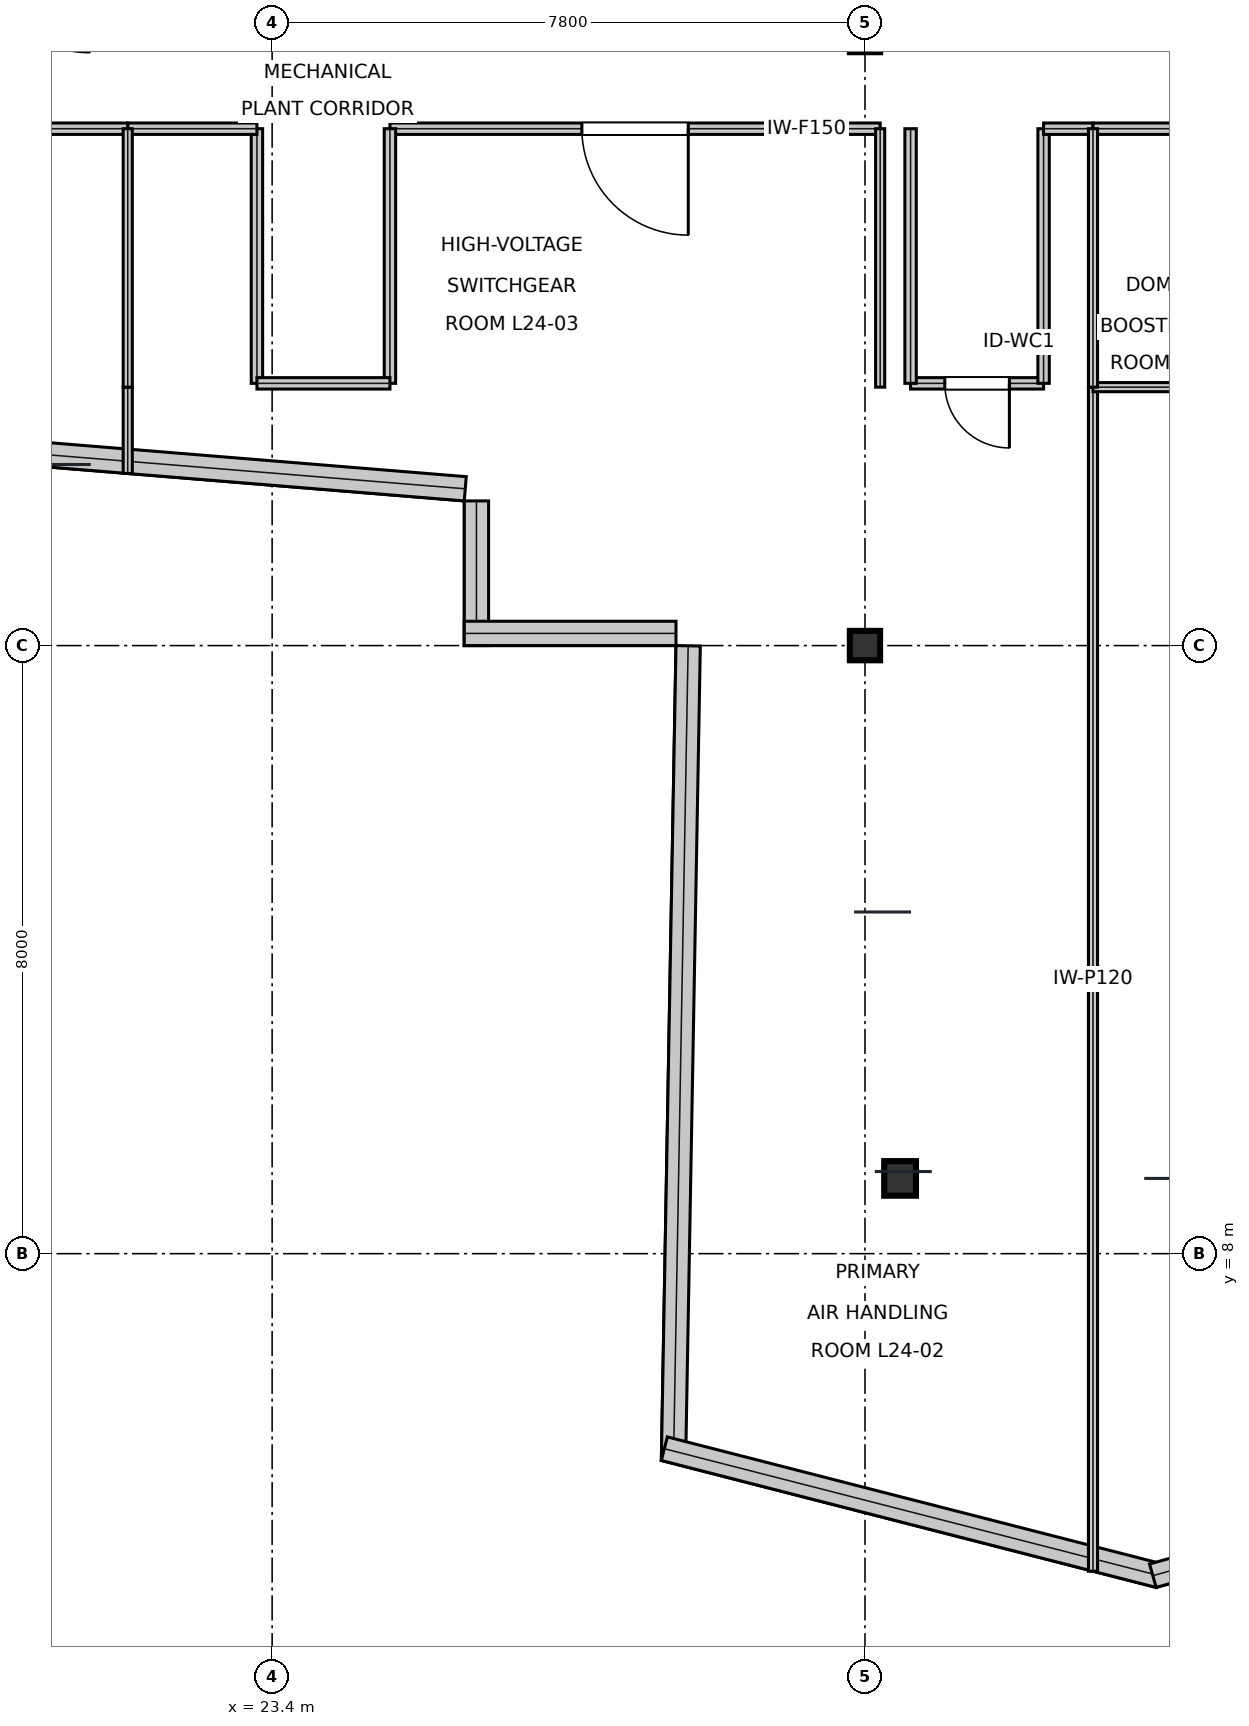
"""IFC4 building model, lengths in metres.
Left out: names, types, materials, properties, quantities, classifications, styles, units other than length and angle.
Written with IfcOpenShell. Run it as: python <this file> out.ifc"""

import sys

from ifc_helpers import new_model, si_unit, direction, frame, frame_2d, origin, origin_2d, place, context, subcontext, project, spatial, rectangle, i_section, extrude, element, fill, save


model = new_model("IFC4")
c1 = context("Model", 3, precision=1e-05, world=origin(), true_north=direction((0.0, 1.0)))
c2 = subcontext(c1, "Body", "Model", "MODEL_VIEW")
j1 = project(units=[si_unit("LENGTHUNIT", "METRE"), si_unit("PLANEANGLEUNIT", "RADIAN")], contexts=[c1])
p1 = place(None, origin())
s1 = spatial("IfcSite", under=j1, at=p1, CompositionType="ELEMENT")
p2 = place(p1, origin())
s2 = spatial("IfcBuilding", under=s1, at=p2, CompositionType="ELEMENT")
p3 = place(p2, frame((0.0, 0.0, 106.65)))
s3 = spatial("IfcBuildingStorey", under=s2, at=p3, CompositionType="ELEMENT", Elevation=106.65)
p4 = place(p3, frame((31.2, 16.0, 0.0), z_axis=(0.0, 0.0, 1.0), x_axis=(1.0, 0.0, 0.0)))
e1 = element("IfcColumn", 1, at=p4, inside=s3, PredefinedType="COLUMN", context=c2, shape_type="SweptSolid", body=[
    extrude(i_section(OverallWidth=0.398, OverallDepth=0.387, WebThickness=0.021, FlangeThickness=0.033, at=origin_2d()), origin(), (0.0, 0.0, 1.0), 5.394),
])
p5 = place(p3, frame((31.662, 8.99, 0.016), z_axis=(0.007821463692, 0.016779768036, 0.999828617359), x_axis=(-0.906371306068, 0.422482018004, 0.0)))
e2 = element("IfcColumn", 2, at=p5, inside=s3, PredefinedType="COLUMN", context=c2, shape_type="SweptSolid", body=[
    extrude(i_section(OverallWidth=0.418, OverallDepth=0.455, WebThickness=0.042, FlangeThickness=0.068, at=origin_2d()), origin(), (0.0, 0.0, 1.0), 5.369),
])
p6 = place(p3, frame((9.513, 19.402, 0.0), z_axis=(0.0, 0.0, 1.0), x_axis=(0.996692994059, -0.081259310815, 0.0)))
e3 = element("IfcWall", 3, at=p6, inside=s3, PredefinedType="STANDARD", context=c2, shape_type="SweptSolid", body=[
    extrude(rectangle(XDim=16.482, YDim=0.32, at=frame_2d((8.241, 0.0))), origin(), (0.0, 0.0, 1.0), 4.648),
])
p7 = place(p3, frame((26.088, 17.903, 0.0), z_axis=(0.0, 0.0, 1.0), x_axis=(0.0, -1.0, 0.0)))
e4 = element("IfcWall", 4, at=p7, inside=s3, PredefinedType="STANDARD", context=c2, shape_type="SweptSolid", body=[
    extrude(rectangle(XDim=1.903, YDim=0.32, at=frame_2d((0.952, 0.0))), origin(), (0.0, 0.0, 1.0), 4.648),
])
p8 = place(p3, frame((25.928, 16.16, 0.0), z_axis=(0.0, 0.0, 1.0), x_axis=(1.0, 0.0, 0.0)))
e5 = element("IfcWall", 5, at=p8, inside=s3, PredefinedType="STANDARD", context=c2, shape_type="SweptSolid", body=[
    extrude(rectangle(XDim=2.786, YDim=0.32, at=frame_2d((1.393, 0.0))), origin(), (0.0, 0.0, 1.0), 5.12),
])
p9 = place(p3, frame((28.874, 15.997, 0.0), z_axis=(0.0, 0.0, 1.0), x_axis=(-0.017987206329, -0.999838217117, 0.0)))
e6 = element("IfcWall", 6, at=p9, inside=s3, PredefinedType="STANDARD", context=c2, shape_type="SweptSolid", body=[
    extrude(rectangle(XDim=10.723, YDim=0.32, at=frame_2d((5.361, 0.0))), origin(), (0.0, 0.0, 1.0), 5.12),
])
p10 = place(p3, frame((28.561, 5.434, 0.0), z_axis=(0.0, 0.0, 1.0), x_axis=(0.968632710221, -0.248496826319, 0.0)))
e7 = element("IfcWall", 7, at=p10, inside=s3, PredefinedType="STANDARD", context=c2, shape_type="SweptSolid", body=[
    extrude(rectangle(XDim=6.721, YDim=0.32, at=frame_2d((3.361, 0.0))), origin(), (0.0, 0.0, 1.0), 5.12),
])
p11 = place(p3, frame((34.988, 3.763, 0.0), z_axis=(0.0, 0.0, 1.0), x_axis=(0.962413642038, 0.27158788931, 0.0)))
e8 = element("IfcWall", 8, at=p11, inside=s3, PredefinedType="STANDARD", context=c2, shape_type="SweptSolid", body=[
    extrude(rectangle(XDim=6.764, YDim=0.32, at=frame_2d((3.382, 0.0))), origin(), (0.0, 0.0, 1.0), 5.12),
])
p12 = place(p3, frame((31.8, 19.45, 0.0), z_axis=(0.0, 0.0, 1.0), x_axis=(1.0, 0.0, 0.0)))
e9 = element("IfcWall", 9, at=p12, inside=s3, PredefinedType="PARTITIONING", context=c2, shape_type="SweptSolid", body=[
    extrude(rectangle(XDim=1.75, YDim=0.15, at=frame_2d((0.875, 0.0))), origin(), (0.0, 0.0, 1.0), 5.12),
])
p13 = place(p12, frame((0.45, 0.0, 0.0)))
e10 = element("IfcOpeningElement", 10, at=p13, cuts=e9, PredefinedType="OPENING", context=c2, shape_type="SweptSolid", body=[
    extrude(rectangle(XDim=0.85, YDim=2.15, at=frame_2d((0.425, 1.075))), frame((0.0, 0.085, 0.0), z_axis=(0.0, -1.0, 0.0), x_axis=(1.0, 0.0, 0.0)), (0.0, 0.0, 1.0), 0.17),
])
p14 = place(p3, frame((24.95, 22.8, 0.0), z_axis=(0.0, 0.0, 1.0), x_axis=(1.0, 0.0, 0.0)))
e11 = element("IfcWall", 11, at=p14, inside=s3, PredefinedType="PARTITIONING", context=c2, shape_type="SweptSolid", body=[
    extrude(rectangle(XDim=6.45, YDim=0.15, at=frame_2d((3.225, 0.0))), origin(), (0.0, 0.0, 1.0), 4.5),
])
p15 = place(p14, frame((2.525, 0.0, 0.0)))
e12 = element("IfcOpeningElement", 12, at=p15, cuts=e11, PredefinedType="OPENING", context=c2, shape_type="SweptSolid", body=[
    extrude(rectangle(XDim=1.4, YDim=2.2, at=frame_2d((0.7, 1.1))), frame((0.0, 0.085, 0.0), z_axis=(0.0, -1.0, 0.0), x_axis=(1.0, 0.0, 0.0)), (0.0, 0.0, 1.0), 0.17),
])
for number, where, z_axis, x_axis in (
    (13, (33.55, 19.45, 0.0), (0.0, 0.0, 1.0), (0.0, 1.0, 0.0)),
    (14, (31.8, 19.45, 0.0), (0.0, 0.0, 1.0), (0.0, 1.0, 0.0)),
):
    element("IfcWall", number, at=place(p3, frame(where, z_axis=z_axis, x_axis=x_axis)), inside=s3, PredefinedType="PARTITIONING", context=c2, shape_type="SweptSolid", body=[
        extrude(rectangle(XDim=3.35, YDim=0.15, at=frame_2d((1.675, 0.0))), origin(), (0.0, 0.0, 1.0), 4.753),
    ])
p16 = place(p3, frame((33.55, 22.8, 0.0), z_axis=(0.0, 0.0, 1.0), x_axis=(1.0, 0.0, 0.0)))
e15 = element("IfcWall", 15, at=p16, inside=s3, PredefinedType="PARTITIONING", context=c2, shape_type="SweptSolid", body=[
    extrude(rectangle(XDim=0.65, YDim=0.15, at=frame_2d((0.325, 0.0))), origin(), (0.0, 0.0, 1.0), 5.12),
])
p17 = place(p3, frame((24.95, 19.45, 0.0), z_axis=(0.0, 0.0, 1.0), x_axis=(0.0, 1.0, 0.0)))
e16 = element("IfcWall", 16, at=p17, inside=s3, PredefinedType="PARTITIONING", context=c2, shape_type="SweptSolid", body=[
    extrude(rectangle(XDim=3.35, YDim=0.15, at=frame_2d((1.675, 0.0))), origin(), (0.0, 0.0, 1.0), 5.12),
])
p18 = place(p3, frame((23.2, 19.45, 0.0), z_axis=(0.0, 0.0, 1.0), x_axis=(0.0, 1.0, 0.0)))
e17 = element("IfcWall", 17, at=p18, inside=s3, PredefinedType="PARTITIONING", context=c2, shape_type="SweptSolid", body=[
    extrude(rectangle(XDim=3.35, YDim=0.15, at=frame_2d((1.675, 0.0))), origin(), (0.0, 0.0, 1.0), 4.5),
])
p19 = place(p3, frame((23.2, 19.45, 0.0), z_axis=(0.0, 0.0, 1.0), x_axis=(1.0, 0.0, 0.0)))
e18 = element("IfcWall", 18, at=p19, inside=s3, PredefinedType="PARTITIONING", context=c2, shape_type="SweptSolid", body=[
    extrude(rectangle(XDim=1.75, YDim=0.15, at=frame_2d((0.875, 0.0))), origin(), (0.0, 0.0, 1.0), 5.12),
])
p20 = place(p3, frame((21.5, 22.8, 0.0), z_axis=(0.0, 0.0, 1.0), x_axis=(1.0, 0.0, 0.0)))
e19 = element("IfcWall", 19, at=p20, inside=s3, PredefinedType="PARTITIONING", context=c2, shape_type="SweptSolid", body=[
    extrude(rectangle(XDim=1.7, YDim=0.15, at=frame_2d((0.85, 0.0))), origin(), (0.0, 0.0, 1.0), 4.5),
])
p21 = place(p3, frame((34.2, 22.8, 0.0), z_axis=(0.0, 0.0, 1.0), x_axis=(1.0, 0.0, 0.0)))
e20 = element("IfcWall", 20, at=p21, inside=s3, PredefinedType="PARTITIONING", context=c2, shape_type="SweptSolid", body=[
    extrude(rectangle(XDim=2.85, YDim=0.15, at=frame_2d((1.425, 0.0))), origin(), (0.0, 0.0, 1.0), 5.12),
])
p22 = place(p3, frame((16.5, 22.8, 0.0), z_axis=(0.0, 0.0, 1.0), x_axis=(1.0, 0.0, 0.0)))
e21 = element("IfcWall", 21, at=p22, inside=s3, PredefinedType="PARTITIONING", context=c2, shape_type="SweptSolid", body=[
    extrude(rectangle(XDim=5.0, YDim=0.15, at=frame_2d((2.5, 0.0))), origin(), (0.0, 0.0, 1.0), 4.753),
])
p23 = place(p3, frame((34.2, 3.822, 0.0), z_axis=(0.0, 0.0, 1.0), x_axis=(0.0, 1.0, 0.0)))
e22 = element("IfcWall", 22, at=p23, inside=s3, PredefinedType="PARTITIONING", context=c2, shape_type="SweptSolid", body=[
    extrude(rectangle(XDim=15.578, YDim=0.12, at=frame_2d((7.789, 0.0))), origin(), (0.0, 0.0, 1.0), 4.5),
])
p24 = place(p3, frame((34.2, 19.4, 0.0), z_axis=(0.0, 0.0, 1.0), x_axis=(1.0, 0.0, 0.0)))
e23 = element("IfcWall", 23, at=p24, inside=s3, PredefinedType="PARTITIONING", context=c2, shape_type="SweptSolid", body=[
    extrude(rectangle(XDim=2.85, YDim=0.12, at=frame_2d((1.425, 0.0))), origin(), (0.0, 0.0, 1.0), 5.12),
])
p25 = place(p3, frame((31.4, 19.4, 0.0), z_axis=(0.0, 0.0, 1.0), x_axis=(0.0, 1.0, 0.0)))
e24 = element("IfcWall", 24, at=p25, inside=s3, PredefinedType="PARTITIONING", context=c2, shape_type="SweptSolid", body=[
    extrude(rectangle(XDim=3.4, YDim=0.12, at=frame_2d((1.7, 0.0))), origin(), (0.0, 0.0, 1.0), 4.5),
])
p26 = place(p3, frame((34.2, 19.4, 0.0), z_axis=(0.0, 0.0, 1.0), x_axis=(0.0, 1.0, 0.0)))
e25 = element("IfcWall", 25, at=p26, inside=s3, PredefinedType="PARTITIONING", context=c2, shape_type="SweptSolid", body=[
    extrude(rectangle(XDim=3.4, YDim=0.12, at=frame_2d((1.7, 0.0))), origin(), (0.0, 0.0, 1.0), 4.753),
])
p27 = place(p3, frame((21.5, 18.264, 0.0), z_axis=(0.0, 0.0, 1.0), x_axis=(0.0, 1.0, 0.0)))
e26 = element("IfcWall", 26, at=p27, inside=s3, PredefinedType="PARTITIONING", context=c2, shape_type="SweptSolid", body=[
    extrude(rectangle(XDim=1.136, YDim=0.12, at=frame_2d((0.568, 0.0))), origin(), (0.0, 0.0, 1.0), 5.12),
])
p28 = place(p3, frame((21.5, 19.4, 0.0), z_axis=(0.0, 0.0, 1.0), x_axis=(0.0, 1.0, 0.0)))
e27 = element("IfcWall", 27, at=p28, inside=s3, PredefinedType="PARTITIONING", context=c2, shape_type="SweptSolid", body=[
    extrude(rectangle(XDim=3.4, YDim=0.12, at=frame_2d((1.7, 0.0))), origin(), (0.0, 0.0, 1.0), 4.5),
])
p29 = place(p13, frame((0.85, 0.0, 0.0), z_axis=(0.0, 0.0, 1.0), x_axis=(-1.0, 0.0, 0.0)))
e28 = element("IfcDoor", 28, at=p29, inside=s3, OperationType="SINGLE_SWING_LEFT", PredefinedType="DOOR", context=c2, shape_type="SweptSolid", body=[
    extrude(rectangle(XDim=0.85, YDim=2.15, at=frame_2d((0.425, 1.075))), frame((0.0, 0.025, 0.0), z_axis=(0.0, -1.0, 0.0), x_axis=(1.0, 0.0, 0.0)), (0.0, 0.0, 1.0), 0.05),
])
fill(e10, e28)
p30 = place(p15, frame((1.4, 0.0, 0.0), z_axis=(0.0, 0.0, 1.0), x_axis=(-1.0, 0.0, 0.0)))
e29 = element("IfcDoor", 29, at=p30, inside=s3, OperationType="SINGLE_SWING_LEFT", PredefinedType="DOOR", context=c2, shape_type="SweptSolid", body=[
    extrude(rectangle(XDim=1.4, YDim=2.2, at=frame_2d((0.7, 1.1))), frame((0.0, 0.025, 0.0), z_axis=(0.0, -1.0, 0.0), x_axis=(1.0, 0.0, 0.0)), (0.0, 0.0, 1.0), 0.05),
])
fill(e12, e29)
save(model, sys.argv[1])
